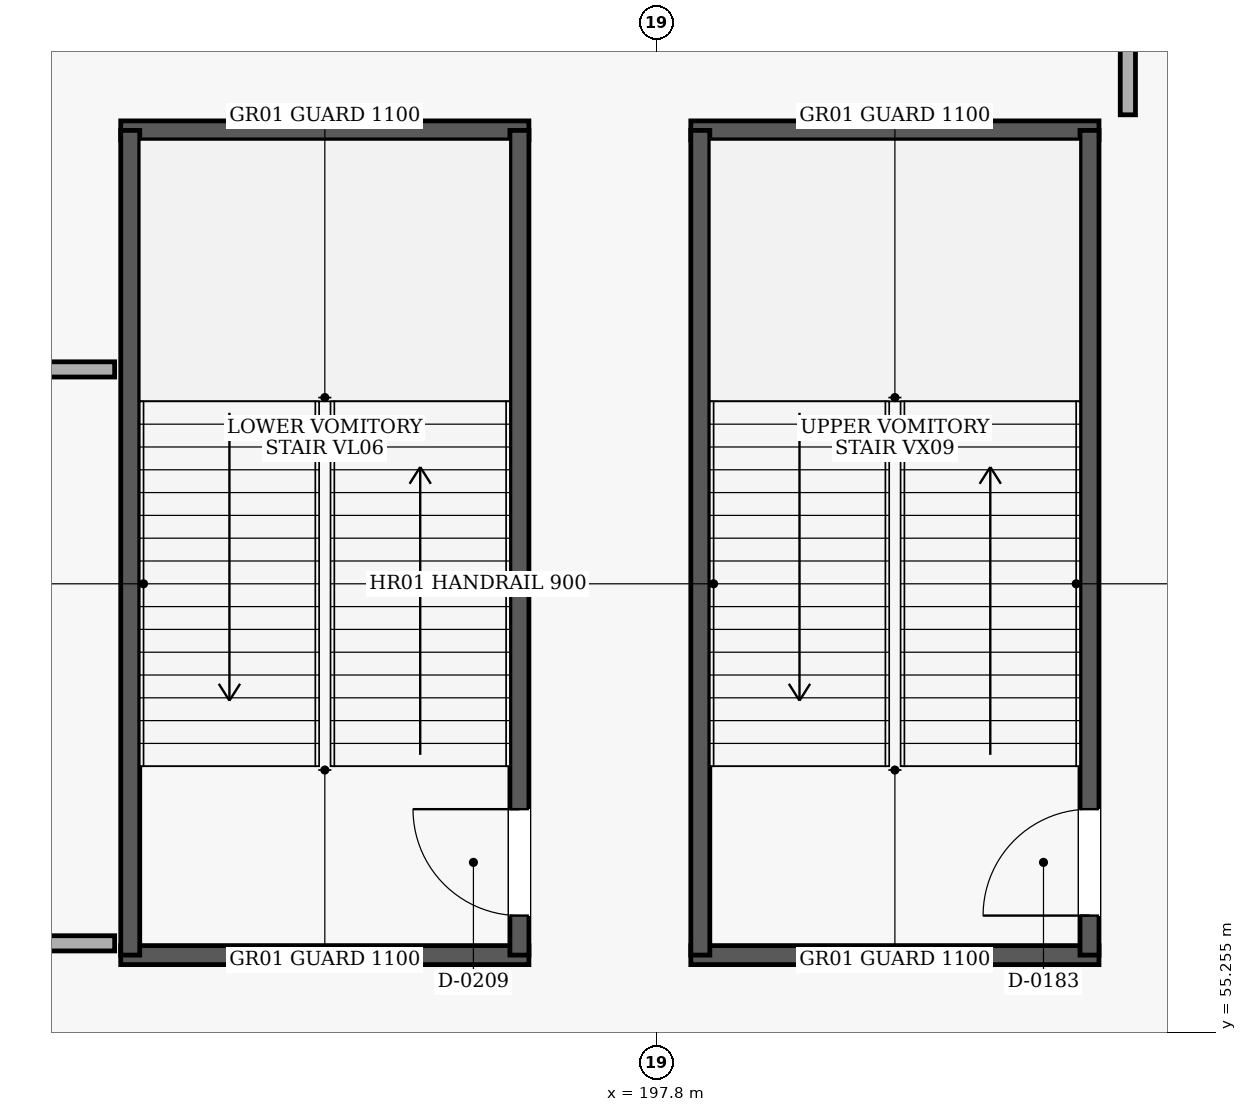
"""IFC4 building model, lengths in metres.
Left out: names, types, materials, properties, quantities, classifications, styles, units other than length and angle.
Written with IfcOpenShell. Run it as: python <this file> out.ifc"""

import sys

from ifc_helpers import new_model, si_unit, direction, frame, frame_2d, origin, place, context, subcontext, project, spatial, rectangle, extrude, element, fill, save


model = new_model("IFC4")
c1 = context("Model", 3, precision=1e-05, world=origin(), true_north=direction((0.0, 1.0)))
c2 = subcontext(c1, "Body", "Model", "MODEL_VIEW")
j1 = project(units=[si_unit("LENGTHUNIT", "METRE"), si_unit("PLANEANGLEUNIT", "RADIAN")], contexts=[c1])
p1 = place(None, origin())
s1 = spatial("IfcSite", under=j1, at=p1, CompositionType="ELEMENT")
p2 = place(p1, origin())
s2 = spatial("IfcBuilding", under=s1, at=p2, CompositionType="ELEMENT")
p3 = place(p2, origin())
s3 = spatial("IfcBuildingStorey", under=s2, at=p3, CompositionType="ELEMENT", Elevation=0.0)
for number, where, z_axis, x_axis in (
    (1, (198.25, 56.275, 0.0), (0.0, 0.0, 1.0), (1.0, 0.0, 0.0)),
    (2, (203.62, 67.125, 0.0), (0.0, 0.0, 1.0), (-1.0, 0.0, 0.0)),
):
    element("IfcWall", number, at=place(p3, frame(where, z_axis=z_axis, x_axis=x_axis)), inside=s3, PredefinedType="SHEAR", context=c2, shape_type="SweptSolid", body=[
        extrude(rectangle(XDim=5.37, YDim=0.25, at=frame_2d((2.685, 0.0))), origin(), (0.0, 0.0, 1.0), 5.08),
    ])
p4 = place(p3, frame((198.375, 56.275, 0.0), z_axis=(0.0, 0.0, 1.0), x_axis=(0.0, 1.0, 0.0)))
e3 = element("IfcWall", 3, at=p4, inside=s3, PredefinedType="SHEAR", context=c2, shape_type="SweptSolid", body=[
    extrude(rectangle(XDim=10.85, YDim=0.25, at=frame_2d((5.425, 0.0))), origin(), (0.0, 0.0, 1.0), 5.08),
])
p5 = place(p3, frame((203.495, 56.275, 0.0), z_axis=(0.0, 0.0, 1.0), x_axis=(0.0, 1.0, 0.0)))
e4 = element("IfcWall", 4, at=p5, inside=s3, PredefinedType="SHEAR", context=c2, shape_type="SweptSolid", body=[
    extrude(rectangle(XDim=10.85, YDim=0.25, at=frame_2d((5.425, 0.0))), origin(), (0.0, 0.0, 1.0), 5.08),
])
p6 = place(p5, frame((0.52, 0.0, 0.0)))
e5 = element("IfcOpeningElement", 5, at=p6, cuts=e4, PredefinedType="OPENING", context=c2, shape_type="SweptSolid", body=[
    extrude(rectangle(XDim=1.4, YDim=2.15, at=frame_2d((0.7, 1.075))), frame((0.0, 0.135, 0.0), z_axis=(0.0, -1.0, 0.0), x_axis=(1.0, 0.0, 0.0)), (0.0, 0.0, 1.0), 0.27),
])
for number, where, z_axis, x_axis in (
    (6, (190.75, 56.275, 0.0), (0.0, 0.0, 1.0), (1.0, 0.0, 0.0)),
    (7, (196.12, 67.125, 0.0), (0.0, 0.0, 1.0), (-1.0, 0.0, 0.0)),
):
    element("IfcWall", number, at=place(p3, frame(where, z_axis=z_axis, x_axis=x_axis)), inside=s3, PredefinedType="SHEAR", context=c2, shape_type="SweptSolid", body=[
        extrude(rectangle(XDim=5.37, YDim=0.25, at=frame_2d((2.685, 0.0))), origin(), (0.0, 0.0, 1.0), 5.08),
    ])
p7 = place(p3, frame((190.875, 56.275, 0.0), z_axis=(0.0, 0.0, 1.0), x_axis=(0.0, 1.0, 0.0)))
e8 = element("IfcWall", 8, at=p7, inside=s3, PredefinedType="SHEAR", context=c2, shape_type="SweptSolid", body=[
    extrude(rectangle(XDim=10.85, YDim=0.25, at=frame_2d((5.425, 0.0))), origin(), (0.0, 0.0, 1.0), 5.08),
])
p8 = place(p3, frame((195.995, 56.275, 0.0), z_axis=(0.0, 0.0, 1.0), x_axis=(0.0, 1.0, 0.0)))
e9 = element("IfcWall", 9, at=p8, inside=s3, PredefinedType="SHEAR", context=c2, shape_type="SweptSolid", body=[
    extrude(rectangle(XDim=10.85, YDim=0.25, at=frame_2d((5.425, 0.0))), origin(), (0.0, 0.0, 1.0), 5.08),
])
p9 = place(p8, frame((0.52, 0.0, 0.0)))
e10 = element("IfcOpeningElement", 10, at=p9, cuts=e9, PredefinedType="OPENING", context=c2, shape_type="SweptSolid", body=[
    extrude(rectangle(XDim=1.4, YDim=2.15, at=frame_2d((0.7, 1.075))), frame((0.0, 0.135, 0.0), z_axis=(0.0, -1.0, 0.0), x_axis=(1.0, 0.0, 0.0)), (0.0, 0.0, 1.0), 0.27),
])
p10 = place(p3, frame((175.6, 56.43, 0.0), z_axis=(0.0, 0.0, 1.0), x_axis=(1.0, 0.0, 0.0)))
e11 = element("IfcWall", 11, at=p10, inside=s3, PredefinedType="PARTITIONING", context=c2, shape_type="SweptSolid", body=[
    extrude(rectangle(XDim=15.07, YDim=0.2, at=frame_2d((7.535, 0.0))), origin(), (0.0, 0.0, 1.0), 5.08),
])
p11 = place(p10, frame((8.151, 0.0, 0.0)))
e12 = element("IfcOpeningElement", 12, at=p11, cuts=e11, PredefinedType="OPENING", context=c2, shape_type="SweptSolid", body=[
    extrude(rectangle(XDim=0.92, YDim=2.1, at=frame_2d((0.46, 1.05))), frame((0.0, 0.11, 0.0), z_axis=(0.0, -1.0, 0.0), x_axis=(1.0, 0.0, 0.0)), (0.0, 0.0, 1.0), 0.22),
])
p12 = place(p3, frame((190.67, 63.98, 0.0), z_axis=(0.0, 0.0, 1.0), x_axis=(-1.0, 0.0, 0.0)))
e13 = element("IfcWall", 13, at=p12, inside=s3, PredefinedType="PARTITIONING", context=c2, shape_type="SweptSolid", body=[
    extrude(rectangle(XDim=15.07, YDim=0.2, at=frame_2d((7.535, 0.0))), origin(), (0.0, 0.0, 1.0), 5.08),
])
p13 = place(p3, frame((204.0, 67.33, 0.0), z_axis=(0.0, 0.0, 1.0), x_axis=(0.0, 1.0, 0.0)))
e14 = element("IfcWall", 14, at=p13, inside=s3, PredefinedType="PARTITIONING", context=c2, shape_type="SweptSolid", body=[
    extrude(rectangle(XDim=3.14, YDim=0.2, at=frame_2d((1.57, 0.0))), origin(), (0.0, 0.0, 1.0), 5.08),
])
p14 = place(p13, frame((1.09, 0.0, 0.0)))
e15 = element("IfcOpeningElement", 15, at=p14, cuts=e14, PredefinedType="OPENING", context=c2, shape_type="SweptSolid", body=[
    extrude(rectangle(XDim=0.96, YDim=2.1, at=frame_2d((0.48, 1.05))), frame((0.0, 0.11, 0.0), z_axis=(0.0, -1.0, 0.0), x_axis=(1.0, 0.0, 0.0)), (0.0, 0.0, 1.0), 0.22),
])
p15 = place(p6, frame((1.4, 0.0, 0.0), z_axis=(0.0, 0.0, 1.0), x_axis=(-1.0, 0.0, 0.0)))
e16 = element("IfcDoor", 16, at=p15, inside=s3, OperationType="SINGLE_SWING_RIGHT", PredefinedType="DOOR", context=c2, shape_type="SweptSolid", body=[
    extrude(rectangle(XDim=1.4, YDim=2.15, at=frame_2d((0.7, 1.075))), frame((0.0, 0.025, 0.0), z_axis=(0.0, -1.0, 0.0), x_axis=(1.0, 0.0, 0.0)), (0.0, 0.0, 1.0), 0.05),
])
fill(e5, e16)
p16 = place(p9, frame((1.4, 0.0, 0.0), z_axis=(0.0, 0.0, 1.0), x_axis=(-1.0, 0.0, 0.0)))
e17 = element("IfcDoor", 17, at=p16, inside=s3, OperationType="SINGLE_SWING_LEFT", PredefinedType="DOOR", context=c2, shape_type="SweptSolid", body=[
    extrude(rectangle(XDim=1.4, YDim=2.15, at=frame_2d((0.7, 1.075))), frame((0.0, 0.025, 0.0), z_axis=(0.0, -1.0, 0.0), x_axis=(1.0, 0.0, 0.0)), (0.0, 0.0, 1.0), 0.05),
])
fill(e10, e17)
save(model, sys.argv[1])
